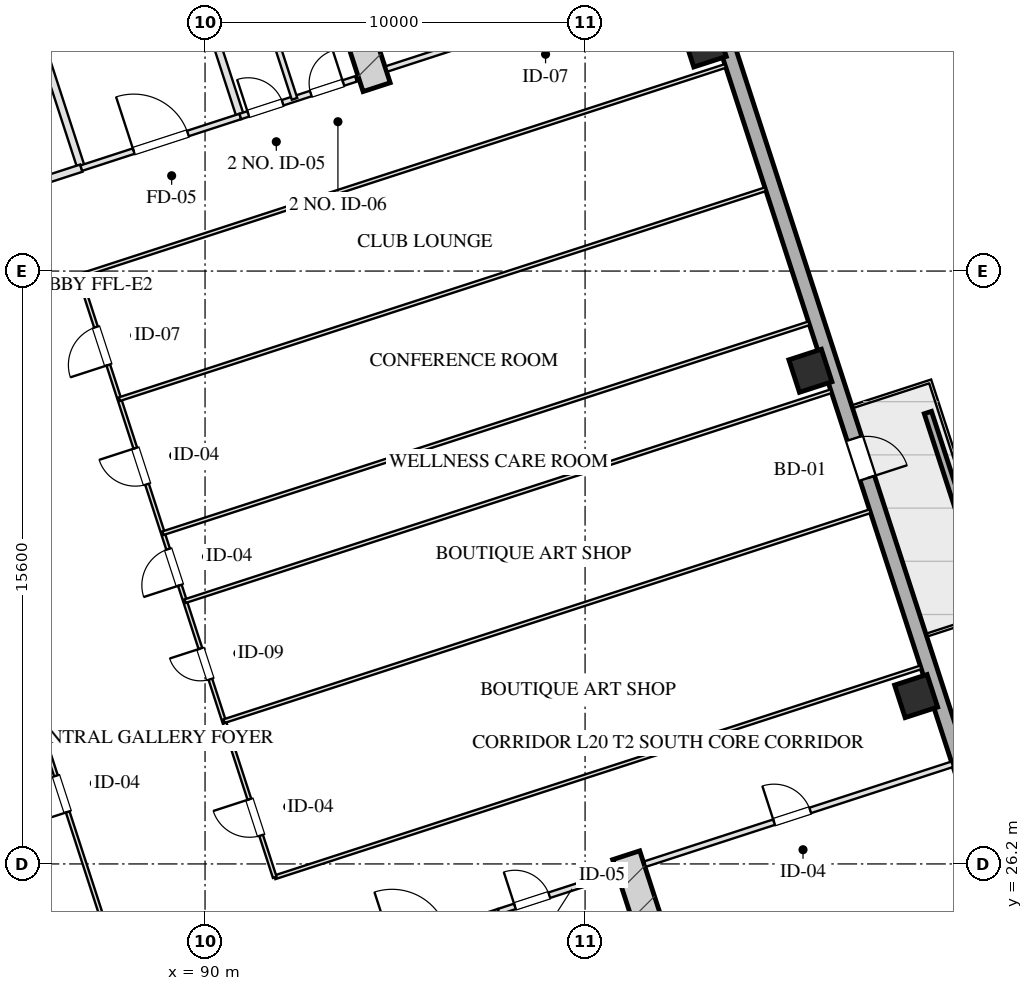
"""IFC4 building model, lengths in metres.
Left out: names, types, materials, properties, quantities, classifications, styles, units other than length and angle.
Written with IfcOpenShell. Run it as: python <this file> out.ifc"""

import sys

from ifc_helpers import new_model, si_unit, direction, frame, frame_2d, origin, origin_2d, place, context, subcontext, project, spatial, rectangle, hollow_rectangle, extrude, element, fill, save


model = new_model("IFC4")
c1 = context("Model", 3, precision=1e-05, world=origin(), true_north=direction((0.0, 1.0)))
c2 = subcontext(c1, "Body", "Model", "MODEL_VIEW")
j1 = project(units=[si_unit("LENGTHUNIT", "METRE"), si_unit("PLANEANGLEUNIT", "RADIAN")], contexts=[c1])
p1 = place(None, origin())
s1 = spatial("IfcSite", under=j1, at=p1, CompositionType="ELEMENT")
p2 = place(p1, origin())
s2 = spatial("IfcBuilding", under=s1, at=p2, CompositionType="ELEMENT")
p3 = place(p2, frame((0.0, 0.0, 81.65)))
s3 = spatial("IfcBuildingStorey", under=s2, at=p3, CompositionType="ELEMENT", Elevation=81.65)
for number, where, z_axis, x_axis in (
    (1, (101.082, 26.429, 0.0), (0.0, 0.0, 1.0), (0.309, -0.951, 0.0)),
    (2, (94.515, 46.639, 0.0), (0.0, 0.0, 1.0), (-0.309, 0.951, 0.0)),
):
    element("IfcWall", number, at=place(p3, frame(where, z_axis=z_axis, x_axis=x_axis)), inside=s3, PredefinedType="SHEAR", context=c2, shape_type="SweptSolid", body=[
        extrude(rectangle(XDim=9.63, YDim=0.75, at=frame_2d((4.815, 0.0))), origin(), (0.0, 0.0, 1.0), 3.45),
    ])
for number, where, z_axis, x_axis in (
    (3, (108.711, 30.616, 0.0), (0.0, 0.0, 1.0), (0.951, 0.309, 0.0)),
    (4, (105.93, 39.176, 0.0), (0.0, 0.0, 1.0), (0.951, 0.309, 0.0)),
    (5, (103.149, 47.736, 0.0), (0.0, 0.0, 1.0), (0.951, 0.309, 0.0)),
):
    element("IfcColumn", number, at=place(p3, frame(where, z_axis=z_axis, x_axis=x_axis)), inside=s3, PredefinedType="COLUMN", context=c2, shape_type="SweptSolid", body=[
        extrude(hollow_rectangle(XDim=0.9, YDim=0.9, WallThickness=0.032, at=origin_2d()), origin(), (0.0, 0.0, 1.0), 3.451),
    ])
p4 = place(p3, frame((99.284, 61.41, 0.0), z_axis=(0.0, 0.0, 1.0), x_axis=(0.309017542002, -0.95105633836, 0.0)))
e6 = element("IfcWall", 6, at=p4, inside=s3, PredefinedType="SOLIDWALL", context=c2, shape_type="SweptSolid", body=[
    extrude(rectangle(XDim=46.4, YDim=0.4, at=frame_2d((23.2, 0.0))), origin(), (0.0, 0.0, 1.0), 2.61),
])
p5 = place(p4, frame((25.25, 0.0, 0.0)))
e7 = element("IfcOpeningElement", 7, at=p5, cuts=e6, PredefinedType="OPENING", context=c2, shape_type="SweptSolid", body=[
    extrude(rectangle(XDim=1.1, YDim=2.15, at=frame_2d((0.55, 1.075))), frame((0.0, 0.21, 0.0), z_axis=(0.0, -1.0, 0.0), x_axis=(1.0, 0.0, 0.0)), (0.0, 0.0, 1.0), 0.42),
])
p6 = place(p3, frame((110.504, 33.512, 0.0), z_axis=(0.0, 0.0, 1.0), x_axis=(-0.308986014439, 0.951066581729, 0.0)))
e8 = element("IfcWall", 8, at=p6, inside=s3, PredefinedType="PARAPET", context=c2, shape_type="SweptSolid", body=[
    extrude(rectangle(XDim=4.8, YDim=0.2, at=frame_2d((2.4, 0.0))), origin(), (0.0, 0.0, 1.0), 0.75),
])
p7 = place(p3, frame((97.727, 24.944, 0.0), z_axis=(0.0, 0.0, 1.0), x_axis=(0.309016001439, -0.951056838919, 0.0)))
e9 = element("IfcWall", 9, at=p7, inside=s3, PredefinedType="PARTITIONING", context=c2, shape_type="SweptSolid", body=[
    extrude(rectangle(XDim=8.43, YDim=0.2, at=frame_2d((4.215, 0.0))), origin(), (0.0, 0.0, 1.0), 3.175),
])
p8 = place(p3, frame((93.542, 23.585, 0.0), z_axis=(0.0, 0.0, 1.0), x_axis=(0.951063829732, 0.308994485023, 0.0)))
e10 = element("IfcWall", 10, at=p8, inside=s3, PredefinedType="PARTITIONING", context=c2, shape_type="SweptSolid", body=[
    extrude(rectangle(XDim=4.4, YDim=0.15, at=frame_2d((2.2, 0.0))), origin(), (0.0, 0.0, 1.0), 3.175),
])
p9 = place(p8, frame((1.45, 0.0, 0.0)))
e11 = element("IfcOpeningElement", 11, at=p9, cuts=e10, PredefinedType="OPENING", context=c2, shape_type="SweptSolid", body=[
    extrude(rectangle(XDim=1.5, YDim=2.05, at=frame_2d((0.75, 1.025))), frame((0.0, 0.085, 0.0), z_axis=(0.0, -1.0, 0.0), x_axis=(1.0, 0.0, 0.0)), (0.0, 0.0, 1.0), 0.17),
])
p10 = place(p3, frame((97.727, 24.944, 0.0), z_axis=(0.0, 0.0, 1.0), x_axis=(0.951036872128, 0.309077446369, 0.0)))
e12 = element("IfcWall", 12, at=p10, inside=s3, PredefinedType="PARTITIONING", context=c2, shape_type="SweptSolid", body=[
    extrude(rectangle(XDim=3.2, YDim=0.15, at=frame_2d((1.6, 0.0))), origin(), (0.0, 0.0, 1.0), 3.175),
])
p11 = place(p10, frame((0.45, 0.0, 0.0)))
e13 = element("IfcOpeningElement", 13, at=p11, cuts=e12, PredefinedType="OPENING", context=c2, shape_type="SweptSolid", body=[
    extrude(rectangle(XDim=0.95, YDim=2.05, at=frame_2d((0.475, 1.025))), frame((0.0, 0.085, 0.0), z_axis=(0.0, -1.0, 0.0), x_axis=(1.0, 0.0, 0.0)), (0.0, 0.0, 1.0), 0.17),
])
p12 = place(p3, frame((86.743, 44.508, 0.0), z_axis=(0.0, 0.0, 1.0), x_axis=(-0.309016001439, 0.951056838919, 0.0)))
e14 = element("IfcWall", 14, at=p12, inside=s3, PredefinedType="PARTITIONING", context=c2, shape_type="SweptSolid", body=[
    extrude(rectangle(XDim=8.43, YDim=0.2, at=frame_2d((4.215, 0.0))), origin(), (0.0, 0.0, 1.0), 3.175),
])
p13 = place(p3, frame((83.101, 43.324, 0.0), z_axis=(0.0, 0.0, 1.0), x_axis=(0.951052804469, 0.309028417967, 0.0)))
e15 = element("IfcWall", 15, at=p13, inside=s3, PredefinedType="PARTITIONING", context=c2, shape_type="SweptSolid", body=[
    extrude(rectangle(XDim=3.83, YDim=0.2, at=frame_2d((1.915, 0.0))), origin(), (0.0, 0.0, 1.0), 3.175),
])
p14 = place(p13, frame((1.35, 0.0, 0.0)))
e16 = element("IfcOpeningElement", 16, at=p14, cuts=e15, PredefinedType="OPENING", context=c2, shape_type="SweptSolid", body=[
    extrude(rectangle(XDim=1.2, YDim=2.05, at=frame_2d((0.6, 1.025))), frame((0.0, 0.11, 0.0), z_axis=(0.0, -1.0, 0.0), x_axis=(1.0, 0.0, 0.0)), (0.0, 0.0, 1.0), 0.22),
])
p15 = place(p3, frame((90.928, 45.868, 0.0), z_axis=(0.0, 0.0, 1.0), x_axis=(-0.309042196757, 0.951048327176, 0.0)))
e17 = element("IfcWall", 17, at=p15, inside=s3, PredefinedType="PARTITIONING", context=c2, shape_type="SweptSolid", body=[
    extrude(rectangle(XDim=8.43, YDim=0.2, at=frame_2d((4.215, 0.0))), origin(), (0.0, 0.0, 1.0), 3.175),
])
p16 = place(p3, frame((86.743, 44.508, 0.0), z_axis=(0.0, 0.0, 1.0), x_axis=(0.951063829732, 0.308994485023, 0.0)))
e18 = element("IfcWall", 18, at=p16, inside=s3, PredefinedType="PARTITIONING", context=c2, shape_type="SweptSolid", body=[
    extrude(rectangle(XDim=4.4, YDim=0.15, at=frame_2d((2.2, 0.0))), origin(), (0.0, 0.0, 1.0), 3.175),
])
p17 = place(p16, frame((1.45, 0.0, 0.0)))
e19 = element("IfcOpeningElement", 19, at=p17, cuts=e18, PredefinedType="OPENING", context=c2, shape_type="SweptSolid", body=[
    extrude(rectangle(XDim=1.5, YDim=2.05, at=frame_2d((0.75, 1.025))), frame((0.0, 0.085, 0.0), z_axis=(0.0, -1.0, 0.0), x_axis=(1.0, 0.0, 0.0)), (0.0, 0.0, 1.0), 0.17),
])
p18 = place(p3, frame((90.928, 45.868, 0.0), z_axis=(0.0, 0.0, 1.0), x_axis=(0.951059297078, 0.309008435874, 0.0)))
e20 = element("IfcWall", 20, at=p18, inside=s3, PredefinedType="PARTITIONING", context=c2, shape_type="SweptSolid", body=[
    extrude(rectangle(XDim=3.2, YDim=0.15, at=frame_2d((1.6, 0.0))), origin(), (0.0, 0.0, 1.0), 3.175),
])
p19 = place(p18, frame((0.22, 0.0, 0.0)))
e21 = element("IfcOpeningElement", 21, at=p19, cuts=e20, PredefinedType="OPENING", context=c2, shape_type="SweptSolid", body=[
    extrude(rectangle(XDim=0.95, YDim=2.05, at=frame_2d((0.475, 1.025))), frame((0.0, 0.085, 0.0), z_axis=(0.0, -1.0, 0.0), x_axis=(1.0, 0.0, 0.0)), (0.0, 0.0, 1.0), 0.17),
])
p20 = place(p18, frame((1.95, 0.0, 0.0)))
e22 = element("IfcOpeningElement", 22, at=p20, cuts=e20, PredefinedType="OPENING", context=c2, shape_type="SweptSolid", body=[
    extrude(rectangle(XDim=0.9, YDim=2.05, at=frame_2d((0.45, 1.025))), frame((0.0, 0.085, 0.0), z_axis=(0.0, -1.0, 0.0), x_axis=(1.0, 0.0, 0.0)), (0.0, 0.0, 1.0), 0.17),
])
p21 = place(p3, frame((92.355, 46.331, 0.0), z_axis=(0.0, 0.0, 1.0), x_axis=(-0.309007490203, 0.951059604335, 0.0)))
e23 = element("IfcWall", 23, at=p21, inside=s3, PredefinedType="PARTITIONING", context=c2, shape_type="SweptSolid", body=[
    extrude(rectangle(XDim=8.43, YDim=0.15, at=frame_2d((4.215, 0.0))), origin(), (0.0, 0.0, 1.0), 3.175),
])
p22 = place(p21, frame((2.55, 0.0, 0.0)))
e24 = element("IfcOpeningElement", 24, at=p22, cuts=e23, PredefinedType="OPENING", context=c2, shape_type="SweptSolid", body=[
    extrude(rectangle(XDim=0.95, YDim=2.05, at=frame_2d((0.475, 1.025))), frame((0.0, 0.085, 0.0), z_axis=(0.0, -1.0, 0.0), x_axis=(1.0, 0.0, 0.0)), (0.0, 0.0, 1.0), 0.17),
])
p23 = place(p21, frame((5.6, 0.0, 0.0)))
e25 = element("IfcOpeningElement", 25, at=p23, cuts=e23, PredefinedType="OPENING", context=c2, shape_type="SweptSolid", body=[
    extrude(rectangle(XDim=0.9, YDim=2.05, at=frame_2d((0.45, 1.025))), frame((0.0, 0.085, 0.0), z_axis=(0.0, -1.0, 0.0), x_axis=(1.0, 0.0, 0.0)), (0.0, 0.0, 1.0), 0.17),
])
p24 = place(p3, frame((101.578, 26.196, 0.0), z_axis=(0.0, 0.0, 1.0), x_axis=(0.951062770994, 0.308997743729, 0.0)))
e26 = element("IfcWall", 26, at=p24, inside=s3, PredefinedType="PARTITIONING", context=c2, shape_type="SweptSolid", body=[
    extrude(rectangle(XDim=8.5, YDim=0.15, at=frame_2d((4.25, 0.0))), origin(), (0.0, 0.0, 1.0), 3.175),
])
p25 = place(p24, frame((3.57, 0.0, 0.0)))
e27 = element("IfcOpeningElement", 27, at=p25, cuts=e26, PredefinedType="OPENING", context=c2, shape_type="SweptSolid", body=[
    extrude(rectangle(XDim=1.0, YDim=2.05, at=frame_2d((0.5, 1.025))), frame((0.0, 0.085, 0.0), z_axis=(0.0, -1.0, 0.0), x_axis=(1.0, 0.0, 0.0)), (0.0, 0.0, 1.0), 0.17),
])
p26 = place(p3, frame((94.78, 47.119, 0.0), z_axis=(0.0, 0.0, 1.0), x_axis=(0.951054329824, 0.309023723562, 0.0)))
e28 = element("IfcWall", 28, at=p26, inside=s3, PredefinedType="PARTITIONING", context=c2, shape_type="SweptSolid", body=[
    extrude(rectangle(XDim=8.5, YDim=0.15, at=frame_2d((4.25, 0.0))), origin(), (0.0, 0.0, 1.0), 3.175),
])
p27 = place(p26, frame((3.57, 0.0, 0.0)))
e29 = element("IfcOpeningElement", 29, at=p27, cuts=e28, PredefinedType="OPENING", context=c2, shape_type="SweptSolid", body=[
    extrude(rectangle(XDim=1.05, YDim=2.05, at=frame_2d((0.525, 1.025))), frame((0.0, 0.085, 0.0), z_axis=(0.0, -1.0, 0.0), x_axis=(1.0, 0.0, 0.0)), (0.0, 0.0, 1.0), 0.17),
])
p28 = place(p3, frame((91.834, 25.848, 0.0), z_axis=(0.0, 0.0, 1.0), x_axis=(0.951055746746, 0.309019362795, 0.0)))
e30 = element("IfcWall", 30, at=p28, inside=s3, PredefinedType="MOVABLE", context=c2, shape_type="SweptSolid", body=[
    extrude(rectangle(XDim=17.875, YDim=0.1, at=frame_2d((8.938, 0.0))), origin(), (0.0, 0.0, 1.0), 3.175),
])
p29 = place(p3, frame((86.692, 41.673, 0.0), z_axis=(0.0, 0.0, 1.0), x_axis=(0.951057050993, 0.309015348739, 0.0)))
e31 = element("IfcWall", 31, at=p29, inside=s3, PredefinedType="MOVABLE", context=c2, shape_type="SweptSolid", body=[
    extrude(rectangle(XDim=17.875, YDim=0.1, at=frame_2d((8.938, 0.0))), origin(), (0.0, 0.0, 1.0), 3.175),
])
p30 = place(p3, frame((87.412, 24.411, 0.0), z_axis=(0.0, 0.0, 1.0), x_axis=(-0.309022042254, 0.951054876125, 0.0)))
e32 = element("IfcWall", 32, at=p30, inside=s3, PredefinedType="MOVABLE", context=c2, shape_type="SweptSolid", body=[
    extrude(rectangle(XDim=16.64, YDim=0.1, at=frame_2d((8.32, 0.0))), origin(), (0.0, 0.0, 1.0), 3.175),
])
p31 = place(p30, frame((3.32, 0.0, 0.0)))
e33 = element("IfcOpeningElement", 33, at=p31, cuts=e32, PredefinedType="OPENING", context=c2, shape_type="SweptSolid", body=[
    extrude(rectangle(XDim=1.0, YDim=2.05, at=frame_2d((0.5, 1.025))), frame((0.0, 0.06, 0.0), z_axis=(0.0, -1.0, 0.0), x_axis=(1.0, 0.0, 0.0)), (0.0, 0.0, 1.0), 0.12),
])
p32 = place(p30, frame((11.64, 0.0, 0.0)))
e34 = element("IfcOpeningElement", 34, at=p32, cuts=e32, PredefinedType="OPENING", context=c2, shape_type="SweptSolid", body=[
    extrude(rectangle(XDim=1.0, YDim=2.05, at=frame_2d((0.5, 1.025))), frame((0.0, 0.06, 0.0), z_axis=(0.0, -1.0, 0.0), x_axis=(1.0, 0.0, 0.0)), (0.0, 0.0, 1.0), 0.12),
])
p33 = place(p3, frame((91.834, 25.848, 0.0), z_axis=(0.0, 0.0, 1.0), x_axis=(-0.30901773025, 0.951056277195, 0.0)))
e35 = element("IfcWall", 35, at=p33, inside=s3, PredefinedType="MOVABLE", context=c2, shape_type="SweptSolid", body=[
    extrude(rectangle(XDim=16.64, YDim=0.1, at=frame_2d((8.32, 0.0))), origin(), (0.0, 0.0, 1.0), 3.175),
])
p34 = place(p33, frame((1.16, 0.0, 0.0)))
e36 = element("IfcOpeningElement", 36, at=p34, cuts=e35, PredefinedType="OPENING", context=c2, shape_type="SweptSolid", body=[
    extrude(rectangle(XDim=1.0, YDim=2.05, at=frame_2d((0.5, 1.025))), frame((0.0, 0.06, 0.0), z_axis=(0.0, -1.0, 0.0), x_axis=(1.0, 0.0, 0.0)), (0.0, 0.0, 1.0), 0.12),
])
p35 = place(p33, frame((5.48, 0.0, 0.0)))
e37 = element("IfcOpeningElement", 37, at=p35, cuts=e35, PredefinedType="OPENING", context=c2, shape_type="SweptSolid", body=[
    extrude(rectangle(XDim=0.85, YDim=2.05, at=frame_2d((0.425, 1.025))), frame((0.0, 0.06, 0.0), z_axis=(0.0, -1.0, 0.0), x_axis=(1.0, 0.0, 0.0)), (0.0, 0.0, 1.0), 0.12),
])
p36 = place(p33, frame((8.08, 0.0, 0.0)))
e38 = element("IfcOpeningElement", 38, at=p36, cuts=e35, PredefinedType="OPENING", context=c2, shape_type="SweptSolid", body=[
    extrude(rectangle(XDim=1.0, YDim=2.05, at=frame_2d((0.5, 1.025))), frame((0.0, 0.06, 0.0), z_axis=(0.0, -1.0, 0.0), x_axis=(1.0, 0.0, 0.0)), (0.0, 0.0, 1.0), 0.12),
])
p37 = place(p33, frame((10.874, 0.0, 0.0)))
e39 = element("IfcOpeningElement", 39, at=p37, cuts=e35, PredefinedType="OPENING", context=c2, shape_type="SweptSolid", body=[
    extrude(rectangle(XDim=1.0, YDim=2.05, at=frame_2d((0.5, 1.025))), frame((0.0, 0.06, 0.0), z_axis=(0.0, -1.0, 0.0), x_axis=(1.0, 0.0, 0.0)), (0.0, 0.0, 1.0), 0.12),
])
p38 = place(p33, frame((14.174, 0.0, 0.0)))
e40 = element("IfcOpeningElement", 40, at=p38, cuts=e35, PredefinedType="OPENING", context=c2, shape_type="SweptSolid", body=[
    extrude(rectangle(XDim=1.05, YDim=2.05, at=frame_2d((0.525, 1.025))), frame((0.0, 0.06, 0.0), z_axis=(0.0, -1.0, 0.0), x_axis=(1.0, 0.0, 0.0)), (0.0, 0.0, 1.0), 0.12),
])
for number, where, z_axis, x_axis in (
    (41, (90.499, 29.956, 0.0), (0.0, 0.0, 1.0), (0.951, 0.309, 0.0)),
    (42, (89.473, 33.114, 0.0), (0.0, 0.0, 1.0), (0.951, 0.309, 0.0)),
):
    element("IfcWall", number, at=place(p3, frame(where, z_axis=z_axis, x_axis=x_axis)), inside=s3, PredefinedType="MOVABLE", context=c2, shape_type="SweptSolid", body=[
        extrude(rectangle(XDim=17.875, YDim=0.1, at=frame_2d((8.938, 0.0))), origin(), (0.0, 0.0, 1.0), 3.175),
    ])
for number, where, z_axis, x_axis in (
    (43, (88.892, 34.902, 0.0), (0.0, 0.0, 1.0), (0.951, 0.309, 0.0)),
    (44, (87.746, 38.429, 0.0), (0.0, 0.0, 1.0), (0.951, 0.309, 0.0)),
):
    element("IfcWall", number, at=place(p3, frame(where, z_axis=z_axis, x_axis=x_axis)), inside=s3, PredefinedType="MOVABLE", context=c2, shape_type="SweptSolid", body=[
        extrude(rectangle(XDim=17.875, YDim=0.1, at=frame_2d((8.938, 0.0))), origin(), (0.0, 0.0, 1.0), 3.175),
    ])
p39 = place(p5, origin())
e45 = element("IfcDoor", 45, at=p39, inside=s3, OperationType="SINGLE_SWING_RIGHT", PredefinedType="DOOR", context=c2, shape_type="SweptSolid", body=[
    extrude(rectangle(XDim=1.1, YDim=2.15, at=frame_2d((0.55, 1.075))), frame((0.0, 0.025, 0.0), z_axis=(0.0, -1.0, 0.0), x_axis=(1.0, 0.0, 0.0)), (0.0, 0.0, 1.0), 0.05),
])
fill(e7, e45)
p40 = place(p11, origin())
e46 = element("IfcDoor", 46, at=p40, inside=s3, OperationType="SINGLE_SWING_LEFT", PredefinedType="DOOR", context=c2, shape_type="SweptSolid", body=[
    extrude(rectangle(XDim=0.95, YDim=2.05, at=frame_2d((0.475, 1.025))), frame((0.0, 0.025, 0.0), z_axis=(0.0, -1.0, 0.0), x_axis=(1.0, 0.0, 0.0)), (0.0, 0.0, 1.0), 0.05),
])
fill(e13, e46)
p41 = place(p17, origin())
e47 = element("IfcDoor", 47, at=p41, inside=s3, OperationType="SINGLE_SWING_LEFT", PredefinedType="DOOR", context=c2, shape_type="SweptSolid", body=[
    extrude(rectangle(XDim=1.5, YDim=2.05, at=frame_2d((0.75, 1.025))), frame((0.0, 0.025, 0.0), z_axis=(0.0, -1.0, 0.0), x_axis=(1.0, 0.0, 0.0)), (0.0, 0.0, 1.0), 0.05),
])
fill(e19, e47)
p42 = place(p19, origin())
e48 = element("IfcDoor", 48, at=p42, inside=s3, OperationType="SINGLE_SWING_LEFT", PredefinedType="DOOR", context=c2, shape_type="SweptSolid", body=[
    extrude(rectangle(XDim=0.95, YDim=2.05, at=frame_2d((0.475, 1.025))), frame((0.0, 0.025, 0.0), z_axis=(0.0, -1.0, 0.0), x_axis=(1.0, 0.0, 0.0)), (0.0, 0.0, 1.0), 0.05),
])
fill(e21, e48)
p43 = place(p20, origin())
e49 = element("IfcDoor", 49, at=p43, inside=s3, OperationType="SINGLE_SWING_RIGHT", PredefinedType="DOOR", context=c2, shape_type="SweptSolid", body=[
    extrude(rectangle(XDim=0.9, YDim=2.05, at=frame_2d((0.45, 1.025))), frame((0.0, 0.025, 0.0), z_axis=(0.0, -1.0, 0.0), x_axis=(1.0, 0.0, 0.0)), (0.0, 0.0, 1.0), 0.05),
])
fill(e22, e49)
p44 = place(p25, origin())
e50 = element("IfcDoor", 50, at=p44, inside=s3, OperationType="SINGLE_SWING_LEFT", PredefinedType="DOOR", context=c2, shape_type="SweptSolid", body=[
    extrude(rectangle(XDim=1.0, YDim=2.05, at=frame_2d((0.5, 1.025))), frame((0.0, 0.025, 0.0), z_axis=(0.0, -1.0, 0.0), x_axis=(1.0, 0.0, 0.0)), (0.0, 0.0, 1.0), 0.05),
])
fill(e27, e50)
p45 = place(p31, origin())
e51 = element("IfcDoor", 51, at=p45, inside=s3, OperationType="SINGLE_SWING_LEFT", PredefinedType="DOOR", context=c2, shape_type="SweptSolid", body=[
    extrude(rectangle(XDim=1.0, YDim=2.05, at=frame_2d((0.5, 1.025))), frame((0.0, 0.025, 0.0), z_axis=(0.0, -1.0, 0.0), x_axis=(1.0, 0.0, 0.0)), (0.0, 0.0, 1.0), 0.05),
])
fill(e33, e51)
p46 = place(p34, origin())
e52 = element("IfcDoor", 52, at=p46, inside=s3, OperationType="SINGLE_SWING_RIGHT", PredefinedType="DOOR", context=c2, shape_type="SweptSolid", body=[
    extrude(rectangle(XDim=1.0, YDim=2.05, at=frame_2d((0.5, 1.025))), frame((0.0, 0.025, 0.0), z_axis=(0.0, -1.0, 0.0), x_axis=(1.0, 0.0, 0.0)), (0.0, 0.0, 1.0), 0.05),
])
fill(e36, e52)
p47 = place(p35, origin())
e53 = element("IfcDoor", 53, at=p47, inside=s3, OperationType="SINGLE_SWING_RIGHT", PredefinedType="DOOR", context=c2, shape_type="SweptSolid", body=[
    extrude(rectangle(XDim=0.85, YDim=2.05, at=frame_2d((0.425, 1.025))), frame((0.0, 0.025, 0.0), z_axis=(0.0, -1.0, 0.0), x_axis=(1.0, 0.0, 0.0)), (0.0, 0.0, 1.0), 0.05),
])
fill(e37, e53)
p48 = place(p36, origin())
e54 = element("IfcDoor", 54, at=p48, inside=s3, OperationType="SINGLE_SWING_LEFT", PredefinedType="DOOR", context=c2, shape_type="SweptSolid", body=[
    extrude(rectangle(XDim=1.0, YDim=2.05, at=frame_2d((0.5, 1.025))), frame((0.0, 0.025, 0.0), z_axis=(0.0, -1.0, 0.0), x_axis=(1.0, 0.0, 0.0)), (0.0, 0.0, 1.0), 0.05),
])
fill(e38, e54)
p49 = place(p37, origin())
e55 = element("IfcDoor", 55, at=p49, inside=s3, OperationType="SINGLE_SWING_RIGHT", PredefinedType="DOOR", context=c2, shape_type="SweptSolid", body=[
    extrude(rectangle(XDim=1.0, YDim=2.05, at=frame_2d((0.5, 1.025))), frame((0.0, 0.025, 0.0), z_axis=(0.0, -1.0, 0.0), x_axis=(1.0, 0.0, 0.0)), (0.0, 0.0, 1.0), 0.05),
])
fill(e39, e55)
p50 = place(p38, origin())
e56 = element("IfcDoor", 56, at=p50, inside=s3, OperationType="SINGLE_SWING_LEFT", PredefinedType="DOOR", context=c2, shape_type="SweptSolid", body=[
    extrude(rectangle(XDim=1.05, YDim=2.05, at=frame_2d((0.525, 1.025))), frame((0.0, 0.025, 0.0), z_axis=(0.0, -1.0, 0.0), x_axis=(1.0, 0.0, 0.0)), (0.0, 0.0, 1.0), 0.05),
])
fill(e40, e56)
save(model, sys.argv[1])
